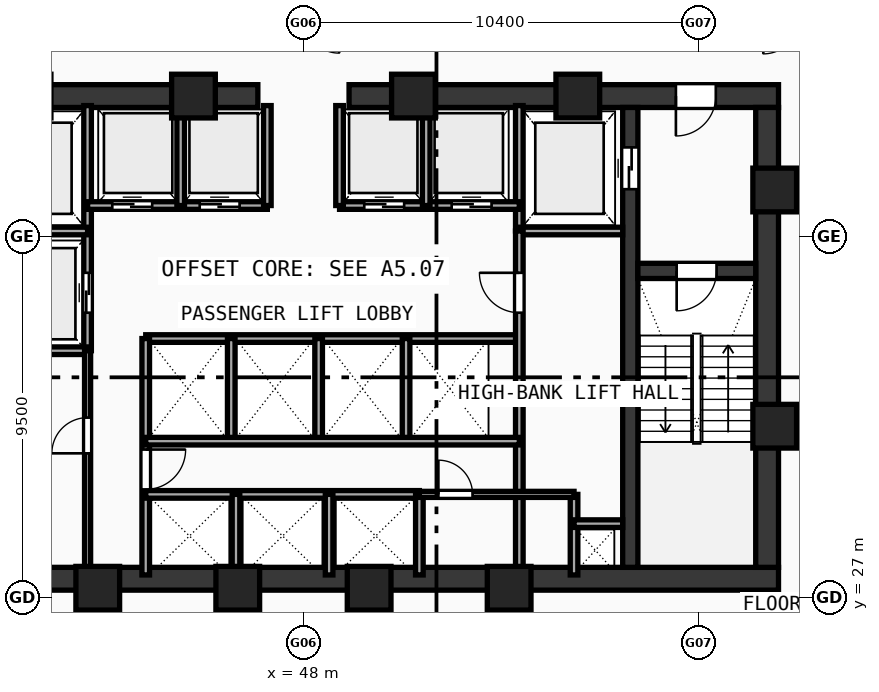
"""IFC4 building model, lengths in metres.
Left out: names, types, materials, properties, quantities, classifications, styles, units other than length and angle.
Written with IfcOpenShell. Run it as: python <this file> out.ifc"""

import sys

from ifc_helpers import new_model, si_unit, direction, frame, frame_2d, origin, origin_with_axes, origin_2d, place, context, subcontext, project, spatial, rectangle, hollow_rectangle, extrude, source, transform, mapped, element, fill, save


model = new_model("IFC4")
c1 = context("Model", 3, precision=1e-05, world=origin(), true_north=direction((0.0, 1.0)))
c2 = subcontext(c1, "Body", "Model", "MODEL_VIEW")
j1 = project(units=[si_unit("LENGTHUNIT", "METRE"), si_unit("PLANEANGLEUNIT", "RADIAN")], contexts=[c1])
p1 = place(None, origin())
s1 = spatial("IfcSite", under=j1, at=p1, CompositionType="ELEMENT")
p2 = place(p1, origin())
s2 = spatial("IfcBuilding", under=s1, at=p2, CompositionType="ELEMENT")
p3 = place(p2, frame((0.0, 0.0, 88.78)))
s3 = spatial("IfcBuildingStorey", under=s2, at=p3, CompositionType="ELEMENT", Elevation=88.78)
p4 = place(p3, frame((35.5, 27.5, 0.0), z_axis=(0.0, 0.0, 1.0), x_axis=(1.0, 0.0, 0.0)))
e1 = element("IfcWall", 1, at=p4, inside=s3, PredefinedType="SHEAR", context=c2, shape_type="SweptSolid", body=[
    extrude(rectangle(XDim=25.0, YDim=0.6, at=frame_2d((12.5, 0.0))), origin(), (0.0, 0.0, 1.0), 3.54),
])
p5 = place(p3, frame((35.5, 40.2, 0.0), z_axis=(0.0, 0.0, 1.0), x_axis=(1.0, 0.0, 0.0)))
e2 = element("IfcWall", 2, at=p5, inside=s3, PredefinedType="SHEAR", context=c2, shape_type="SweptSolid", body=[
    extrude(rectangle(XDim=11.3, YDim=0.6, at=frame_2d((5.65, 0.0))), origin(), (0.0, 0.0, 1.0), 3.54),
])
p6 = place(p5, frame((1.65, 0.0, 0.0)))
e3 = element("IfcOpeningElement", 3, at=p6, cuts=e2, PredefinedType="OPENING", context=c2, shape_type="SweptSolid", body=[
    extrude(rectangle(XDim=1.05, YDim=2.1, at=frame_2d((0.525, 1.05))), frame((0.0, 0.31, 0.0), z_axis=(0.0, -1.0, 0.0), x_axis=(1.0, 0.0, 0.0)), (0.0, 0.0, 1.0), 0.62),
])
p7 = place(p3, frame((49.2, 40.2, 0.0), z_axis=(0.0, 0.0, 1.0), x_axis=(1.0, 0.0, 0.0)))
e4 = element("IfcWall", 4, at=p7, inside=s3, PredefinedType="SHEAR", context=c2, shape_type="SweptSolid", body=[
    extrude(rectangle(XDim=11.3, YDim=0.6, at=frame_2d((5.65, 0.0))), origin(), (0.0, 0.0, 1.0), 3.54),
])
p8 = place(p7, frame((8.6, 0.0, 0.0)))
e5 = element("IfcOpeningElement", 5, at=p8, cuts=e4, PredefinedType="OPENING", context=c2, shape_type="SweptSolid", body=[
    extrude(rectangle(XDim=1.05, YDim=2.1, at=frame_2d((0.525, 1.05))), frame((0.0, 0.31, 0.0), z_axis=(0.0, -1.0, 0.0), x_axis=(1.0, 0.0, 0.0)), (0.0, 0.0, 1.0), 0.62),
])
p9 = place(p3, frame((60.2, 27.8, 0.0), z_axis=(0.0, 0.0, 1.0), x_axis=(0.0, 1.0, 0.0)))
e6 = element("IfcWall", 6, at=p9, inside=s3, PredefinedType="SHEAR", context=c2, shape_type="SweptSolid", body=[
    extrude(rectangle(XDim=12.1, YDim=0.6, at=frame_2d((6.05, 0.0))), origin(), (0.0, 0.0, 1.0), 3.54),
])
p10 = place(p3, frame((56.6, 27.8, 0.0), z_axis=(0.0, 0.0, 1.0), x_axis=(0.0, 1.0, 0.0)))
e7 = element("IfcWall", 7, at=p10, inside=s3, PredefinedType="SHEAR", context=c2, shape_type="SweptSolid", body=[
    extrude(rectangle(XDim=12.1, YDim=0.4, at=frame_2d((6.05, 0.0))), origin(), (0.0, 0.0, 1.0), 3.54),
])
p11 = place(p10, frame((9.95, 0.0, 0.0)))
e8 = element("IfcOpeningElement", 8, at=p11, cuts=e7, PredefinedType="OPENING", context=c2, shape_type="SweptSolid", body=[
    extrude(rectangle(XDim=1.1, YDim=2.1, at=frame_2d((0.55, 1.05))), frame((0.0, 0.21, 0.0), z_axis=(0.0, -1.0, 0.0), x_axis=(1.0, 0.0, 0.0)), (0.0, 0.0, 1.0), 0.42),
])
p12 = place(p3, frame((56.8, 35.6, 0.0), z_axis=(0.0, 0.0, 1.0), x_axis=(1.0, 0.0, 0.0)))
e9 = element("IfcWall", 9, at=p12, inside=s3, PredefinedType="SHEAR", context=c2, shape_type="SweptSolid", body=[
    extrude(rectangle(XDim=3.1, YDim=0.4, at=frame_2d((1.55, 0.0))), origin(), (0.0, 0.0, 1.0), 3.54),
])
p13 = place(p12, frame((1.02, 0.0, 0.0)))
e10 = element("IfcOpeningElement", 10, at=p13, cuts=e9, PredefinedType="OPENING", context=c2, shape_type="SweptSolid", body=[
    extrude(rectangle(XDim=1.05, YDim=2.1, at=frame_2d((0.525, 1.05))), frame((0.0, 0.21, 0.0), z_axis=(0.0, -1.0, 0.0), x_axis=(1.0, 0.0, 0.0)), (0.0, 0.0, 1.0), 0.42),
])
m1 = source(origin(), c2, "Body", "SweptSolid", [
    extrude(hollow_rectangle(XDim=1.15, YDim=1.15, WallThickness=0.048, at=origin_2d()), origin(), (0.0, 0.0, 1.0), 3.8),
])
for number, where, z_axis, x_axis in (
    (11, (42.588, 27.25, -0.26), (0.0, 0.0, 1.0), (1.0, 0.0, 0.0)),
    (12, (46.272, 27.25, -0.26), (0.0, 0.0, 1.0), (1.0, 0.0, 0.0)),
    (13, (49.729, 27.25, -0.26), (0.0, 0.0, 1.0), (1.0, 0.0, 0.0)),
    (14, (53.412, 27.25, -0.26), (0.0, 0.0, 1.0), (1.0, 0.0, 0.0)),
    (15, (60.4, 31.513, -0.26), (0.0, 0.0, 1.0), (1.0, 0.0, 0.0)),
    (16, (60.4, 37.729, -0.26), (0.0, 0.0, 1.0), (1.0, 0.0, 0.0)),
    (17, (55.219, 40.2, -0.26), (0.0, 0.0, 1.0), (1.0, 0.0, 0.0)),
    (18, (50.894, 40.2, -0.26), (0.0, 0.0, 1.0), (1.0, 0.0, 0.0)),
    (19, (45.106, 40.2, -0.26), (0.0, 0.0, 1.0), (1.0, 0.0, 0.0)),
):
    element("IfcColumn", number, at=place(p3, frame(where, z_axis=z_axis, x_axis=x_axis)), inside=s3, PredefinedType="COLUMN", context=c2, shape_type="MappedRepresentation", body=[
        mapped(m1, transform((0.0, 0.0, 0.0), scale=1.0)),
    ])
p14 = place(p3, frame((42.32, 33.5, 0.0), z_axis=(0.0, 0.0, 1.0), x_axis=(0.0, 1.0, 0.0)))
e20 = element("IfcWall", 20, at=p14, inside=s3, PredefinedType="SOLIDWALL", context=c2, shape_type="SweptSolid", body=[
    extrude(rectangle(XDim=6.45, YDim=0.2, at=frame_2d((3.225, 0.0))), origin(), (0.0, 0.0, 1.0), 3.54),
])
p15 = place(p14, frame((1.0, 0.0, 0.0)))
e21 = element("IfcOpeningElement", 21, at=p15, cuts=e20, PredefinedType="OPENING", context=c2, shape_type="SweptSolid", body=[
    extrude(rectangle(XDim=1.05, YDim=2.1, at=frame_2d((0.525, 1.05))), frame((0.0, 0.11, 0.0), z_axis=(0.0, -1.0, 0.0), x_axis=(1.0, 0.0, 0.0)), (0.0, 0.0, 1.0), 0.22),
])
for number, where, z_axis, x_axis in (
    (22, (39.6, 36.65, 0.0), (0.0, 0.0, 1.0), (1.0, 0.0, 0.0)),
    (23, (39.6, 33.5, 0.0), (0.0, 0.0, 1.0), (1.0, 0.0, 0.0)),
):
    element("IfcWall", number, at=place(p3, frame(where, z_axis=z_axis, x_axis=x_axis)), inside=s3, PredefinedType="SOLIDWALL", context=c2, shape_type="SweptSolid", body=[
        extrude(rectangle(XDim=2.72, YDim=0.2, at=frame_2d((1.36, 0.0))), origin(), (0.0, 0.0, 1.0), 3.54),
    ])
p16 = place(p3, frame((53.68, 36.65, 0.0), z_axis=(0.0, 0.0, 1.0), x_axis=(0.0, 1.0, 0.0)))
e24 = element("IfcWall", 24, at=p16, inside=s3, PredefinedType="SOLIDWALL", context=c2, shape_type="SweptSolid", body=[
    extrude(rectangle(XDim=3.3, YDim=0.2, at=frame_2d((1.65, 0.0))), origin(), (0.0, 0.0, 1.0), 3.54),
])
p17 = place(p3, frame((53.68, 36.65, 0.0), z_axis=(0.0, 0.0, 1.0), x_axis=(1.0, 0.0, 0.0)))
e25 = element("IfcWall", 25, at=p17, inside=s3, PredefinedType="SOLIDWALL", context=c2, shape_type="SweptSolid", body=[
    extrude(rectangle(XDim=2.72, YDim=0.2, at=frame_2d((1.36, 0.0))), origin(), (0.0, 0.0, 1.0), 3.54),
])
p18 = place(p3, frame((42.32, 37.32, 0.0), z_axis=(0.0, 0.0, 1.0), x_axis=(1.0, 0.0, 0.0)))
e26 = element("IfcWall", 26, at=p18, inside=s3, PredefinedType="SOLIDWALL", context=c2, shape_type="SweptSolid", body=[
    extrude(rectangle(XDim=4.73, YDim=0.2, at=frame_2d((2.365, 0.0))), origin(), (0.0, 0.0, 1.0), 3.54),
])
p19 = place(p18, frame((0.65, 0.0, 0.0)))
e27 = element("IfcOpeningElement", 27, at=p19, cuts=e26, PredefinedType="OPENING", context=c2, shape_type="SweptSolid", body=[
    extrude(rectangle(XDim=1.05, YDim=2.1, at=frame_2d((0.525, 1.05))), frame((0.0, 0.11, 0.0), z_axis=(0.0, -1.0, 0.0), x_axis=(1.0, 0.0, 0.0)), (0.0, 0.0, 1.0), 0.22),
])
p20 = place(p18, frame((2.95, 0.0, 0.0)))
e28 = element("IfcOpeningElement", 28, at=p20, cuts=e26, PredefinedType="OPENING", context=c2, shape_type="SweptSolid", body=[
    extrude(rectangle(XDim=1.05, YDim=2.1, at=frame_2d((0.525, 1.05))), frame((0.0, 0.11, 0.0), z_axis=(0.0, -1.0, 0.0), x_axis=(1.0, 0.0, 0.0)), (0.0, 0.0, 1.0), 0.22),
])
p21 = place(p3, frame((48.95, 37.32, 0.0), z_axis=(0.0, 0.0, 1.0), x_axis=(1.0, 0.0, 0.0)))
e29 = element("IfcWall", 29, at=p21, inside=s3, PredefinedType="SOLIDWALL", context=c2, shape_type="SweptSolid", body=[
    extrude(rectangle(XDim=4.73, YDim=0.2, at=frame_2d((2.365, 0.0))), origin(), (0.0, 0.0, 1.0), 3.54),
])
p22 = place(p21, frame((0.65, 0.0, 0.0)))
e30 = element("IfcOpeningElement", 30, at=p22, cuts=e29, PredefinedType="OPENING", context=c2, shape_type="SweptSolid", body=[
    extrude(rectangle(XDim=1.05, YDim=2.1, at=frame_2d((0.525, 1.05))), frame((0.0, 0.11, 0.0), z_axis=(0.0, -1.0, 0.0), x_axis=(1.0, 0.0, 0.0)), (0.0, 0.0, 1.0), 0.22),
])
p23 = place(p21, frame((2.95, 0.0, 0.0)))
e31 = element("IfcOpeningElement", 31, at=p23, cuts=e29, PredefinedType="OPENING", context=c2, shape_type="SweptSolid", body=[
    extrude(rectangle(XDim=1.05, YDim=2.1, at=frame_2d((0.525, 1.05))), frame((0.0, 0.11, 0.0), z_axis=(0.0, -1.0, 0.0), x_axis=(1.0, 0.0, 0.0)), (0.0, 0.0, 1.0), 0.22),
])
for number, where, z_axis, x_axis in (
    (32, (47.05, 37.32, 0.0), (0.0, 0.0, 1.0), (0.0, 1.0, 0.0)),
    (33, (48.95, 37.32, 0.0), (0.0, 0.0, 1.0), (0.0, 1.0, 0.0)),
    (34, (44.77, 37.32, 0.0), (0.0, 0.0, 1.0), (0.0, 1.0, 0.0)),
    (35, (51.23, 37.32, 0.0), (0.0, 0.0, 1.0), (0.0, 1.0, 0.0)),
):
    element("IfcWall", number, at=place(p3, frame(where, z_axis=z_axis, x_axis=x_axis)), inside=s3, PredefinedType="SOLIDWALL", context=c2, shape_type="SweptSolid", body=[
        extrude(rectangle(XDim=2.63, YDim=0.2, at=frame_2d((1.315, 0.0))), origin(), (0.0, 0.0, 1.0), 3.54),
    ])
p24 = place(p3, frame((43.85, 33.82, 0.0), z_axis=(0.0, 0.0, 1.0), x_axis=(1.0, 0.0, 0.0)))
e36 = element("IfcWall", 36, at=p24, inside=s3, PredefinedType="SOLIDWALL", context=c2, shape_type="SweptSolid", body=[
    extrude(rectangle(XDim=9.83, YDim=0.2, at=frame_2d((4.915, 0.0))), origin(), (0.0, 0.0, 1.0), 3.54),
])
p25 = place(p3, frame((43.85, 27.6, 0.0), z_axis=(0.0, 0.0, 1.0), x_axis=(0.0, 1.0, 0.0)))
e37 = element("IfcWall", 37, at=p25, inside=s3, PredefinedType="SOLIDWALL", context=c2, shape_type="SweptSolid", body=[
    extrude(rectangle(XDim=6.22, YDim=0.2, at=frame_2d((3.11, 0.0))), origin(), (0.0, 0.0, 1.0), 3.54),
])
p26 = place(p25, frame((2.25, 0.0, 0.0)))
e38 = element("IfcOpeningElement", 38, at=p26, cuts=e37, PredefinedType="OPENING", context=c2, shape_type="SweptSolid", body=[
    extrude(rectangle(XDim=1.05, YDim=2.1, at=frame_2d((0.525, 1.05))), frame((0.0, 0.11, 0.0), z_axis=(0.0, -1.0, 0.0), x_axis=(1.0, 0.0, 0.0)), (0.0, 0.0, 1.0), 0.22),
])
p27 = place(p3, frame((53.68, 27.6, 0.0), z_axis=(0.0, 0.0, 1.0), x_axis=(0.0, 1.0, 0.0)))
e39 = element("IfcWall", 39, at=p27, inside=s3, PredefinedType="SOLIDWALL", context=c2, shape_type="SweptSolid", body=[
    extrude(rectangle(XDim=9.05, YDim=0.2, at=frame_2d((4.525, 0.0))), origin(), (0.0, 0.0, 1.0), 3.54),
])
p28 = place(p27, frame((6.9, 0.0, 0.0)))
e40 = element("IfcOpeningElement", 40, at=p28, cuts=e39, PredefinedType="OPENING", context=c2, shape_type="SweptSolid", body=[
    extrude(rectangle(XDim=1.05, YDim=2.1, at=frame_2d((0.525, 1.05))), frame((0.0, 0.11, 0.0), z_axis=(0.0, -1.0, 0.0), x_axis=(1.0, 0.0, 0.0)), (0.0, 0.0, 1.0), 0.22),
])
for number, where, z_axis, x_axis in (
    (41, (46.1, 31.12, 0.0), (0.0, 0.0, 1.0), (0.0, 1.0, 0.0)),
    (42, (48.4, 31.12, 0.0), (0.0, 0.0, 1.0), (0.0, 1.0, 0.0)),
    (43, (50.7, 31.12, 0.0), (0.0, 0.0, 1.0), (0.0, 1.0, 0.0)),
):
    element("IfcWall", number, at=place(p3, frame(where, z_axis=z_axis, x_axis=x_axis)), inside=s3, PredefinedType="SOLIDWALL", context=c2, shape_type="SweptSolid", body=[
        extrude(rectangle(XDim=2.7, YDim=0.2, at=frame_2d((1.35, 0.0))), origin(), (0.0, 0.0, 1.0), 3.54),
    ])
p29 = place(p3, frame((43.85, 29.72, 0.0), z_axis=(0.0, 0.0, 1.0), x_axis=(1.0, 0.0, 0.0)))
e44 = element("IfcWall", 44, at=p29, inside=s3, PredefinedType="SOLIDWALL", context=c2, shape_type="SweptSolid", body=[
    extrude(rectangle(XDim=7.2, YDim=0.2, at=frame_2d((3.6, 0.0))), origin(), (0.0, 0.0, 1.0), 3.54),
])
p30 = place(p3, frame((51.05, 27.6, 0.0), z_axis=(0.0, 0.0, 1.0), x_axis=(0.0, 1.0, 0.0)))
e45 = element("IfcWall", 45, at=p30, inside=s3, PredefinedType="SOLIDWALL", context=c2, shape_type="SweptSolid", body=[
    extrude(rectangle(XDim=2.12, YDim=0.2, at=frame_2d((1.06, 0.0))), origin(), (0.0, 0.0, 1.0), 3.54),
])
p31 = place(p3, frame((43.85, 31.12, 0.0), z_axis=(0.0, 0.0, 1.0), x_axis=(1.0, 0.0, 0.0)))
e46 = element("IfcWall", 46, at=p31, inside=s3, PredefinedType="SOLIDWALL", context=c2, shape_type="SweptSolid", body=[
    extrude(rectangle(XDim=9.83, YDim=0.2, at=frame_2d((4.915, 0.0))), origin(), (0.0, 0.0, 1.0), 3.54),
])
for number, where, z_axis, x_axis in (
    (47, (46.225, 27.6, 0.0), (0.0, 0.0, 1.0), (0.0, 1.0, 0.0)),
    (48, (48.675, 27.6, 0.0), (0.0, 0.0, 1.0), (0.0, 1.0, 0.0)),
    (49, (55.12, 27.6, 0.0), (0.0, 0.0, 1.0), (0.0, 1.0, 0.0)),
):
    element("IfcWall", number, at=place(p3, frame(where, z_axis=z_axis, x_axis=x_axis)), inside=s3, PredefinedType="SOLIDWALL", context=c2, shape_type="SweptSolid", body=[
        extrude(rectangle(XDim=2.12, YDim=0.2, at=frame_2d((1.06, 0.0))), origin(), (0.0, 0.0, 1.0), 3.54),
    ])
p32 = place(p3, frame((55.12, 28.95, 0.0), z_axis=(0.0, 0.0, 1.0), x_axis=(1.0, 0.0, 0.0)))
e50 = element("IfcWall", 50, at=p32, inside=s3, PredefinedType="SOLIDWALL", context=c2, shape_type="SweptSolid", body=[
    extrude(rectangle(XDim=1.28, YDim=0.2, at=frame_2d((0.64, 0.0))), origin(), (0.0, 0.0, 1.0), 3.54),
])
p33 = place(p3, frame((42.32, 27.6, 0.0), z_axis=(0.0, 0.0, 1.0), x_axis=(0.0, 1.0, 0.0)))
e51 = element("IfcWall", 51, at=p33, inside=s3, PredefinedType="PARTITIONING", context=c2, shape_type="SweptSolid", body=[
    extrude(rectangle(XDim=5.9, YDim=0.16, at=frame_2d((2.95, 0.0))), origin(), (0.0, 0.0, 1.0), 3.54),
])
p34 = place(p33, frame((3.2, 0.0, 0.0)))
e52 = element("IfcOpeningElement", 52, at=p34, cuts=e51, PredefinedType="OPENING", context=c2, shape_type="SweptSolid", body=[
    extrude(rectangle(XDim=0.94, YDim=2.1, at=frame_2d((0.47, 1.05))), frame((0.0, 0.09, 0.0), z_axis=(0.0, -1.0, 0.0), x_axis=(1.0, 0.0, 0.0)), (0.0, 0.0, 1.0), 0.18),
])
p35 = place(p3, frame((51.05, 29.72, 0.0), z_axis=(0.0, 0.0, 1.0), x_axis=(1.0, 0.0, 0.0)))
e53 = element("IfcWall", 53, at=p35, inside=s3, PredefinedType="PARTITIONING", context=c2, shape_type="SweptSolid", body=[
    extrude(rectangle(XDim=4.07, YDim=0.16, at=frame_2d((2.035, 0.0))), origin(), (0.0, 0.0, 1.0), 3.54),
])
p36 = place(p35, frame((0.5, 0.0, 0.0)))
e54 = element("IfcOpeningElement", 54, at=p36, cuts=e53, PredefinedType="OPENING", context=c2, shape_type="SweptSolid", body=[
    extrude(rectangle(XDim=0.9, YDim=2.1, at=frame_2d((0.45, 1.05))), frame((0.0, 0.09, 0.0), z_axis=(0.0, -1.0, 0.0), x_axis=(1.0, 0.0, 0.0)), (0.0, 0.0, 1.0), 0.18),
])
m2 = source(origin(), c2, "Body", "SweptSolid", [
    extrude(rectangle(XDim=1.05, YDim=2.1, at=frame_2d((0.525, 1.05))), frame((0.0, 0.025, 0.0), z_axis=(0.0, -1.0, 0.0), x_axis=(1.0, 0.0, 0.0)), (0.0, 0.0, 1.0), 0.05),
])
p37 = place(p13, frame((1.05, 0.0, 0.0), z_axis=(0.0, 0.0, 1.0), x_axis=(-1.0, 0.0, 0.0)))
e55 = element("IfcDoor", 55, at=p37, inside=s3, OperationType="SINGLE_SWING_RIGHT", PredefinedType="DOOR", context=c2, shape_type="MappedRepresentation", body=[
    mapped(m2, transform((0.0, 0.0, 0.0), scale=1.0)),
])
fill(e10, e55)
p38 = place(p8, frame((1.05, 0.0, 0.0), z_axis=(0.0, 0.0, 1.0), x_axis=(-1.0, 0.0, 0.0)))
e56 = element("IfcDoor", 56, at=p38, inside=s3, OperationType="SINGLE_SWING_RIGHT", PredefinedType="DOOR", context=c2, shape_type="MappedRepresentation", body=[
    mapped(m2, transform((0.0, 0.0, 0.0), scale=1.0)),
])
fill(e5, e56)
m3 = source(origin(), c2, "Body", "SweptSolid", [
    extrude(rectangle(XDim=1.1, YDim=2.1, at=frame_2d((0.55, 1.05))), frame((0.0, 0.025, 0.0), z_axis=(0.0, -1.0, 0.0), x_axis=(1.0, 0.0, 0.0)), (0.0, 0.0, 1.0), 0.05),
])
p39 = place(p11, origin_with_axes())
e57 = element("IfcDoor", 57, at=p39, inside=s3, OperationType="DOUBLE_DOOR_SLIDING", PredefinedType="DOOR", context=c2, shape_type="MappedRepresentation", body=[
    mapped(m3, transform((0.0, 0.0, 0.0), scale=1.0)),
])
fill(e8, e57)
p40 = place(p15, origin_with_axes())
e58 = element("IfcDoor", 58, at=p40, inside=s3, OperationType="DOUBLE_DOOR_SLIDING", PredefinedType="DOOR", context=c2, shape_type="MappedRepresentation", body=[
    mapped(m2, transform((0.0, 0.0, 0.0), scale=1.0)),
])
fill(e21, e58)
p41 = place(p19, frame((1.05, 0.0, 0.0), z_axis=(0.0, 0.0, 1.0), x_axis=(-1.0, 0.0, 0.0)))
e59 = element("IfcDoor", 59, at=p41, inside=s3, OperationType="DOUBLE_DOOR_SLIDING", PredefinedType="DOOR", context=c2, shape_type="MappedRepresentation", body=[
    mapped(m2, transform((0.0, 0.0, 0.0), scale=1.0)),
])
fill(e27, e59)
p42 = place(p20, frame((1.05, 0.0, 0.0), z_axis=(0.0, 0.0, 1.0), x_axis=(-1.0, 0.0, 0.0)))
e60 = element("IfcDoor", 60, at=p42, inside=s3, OperationType="DOUBLE_DOOR_SLIDING", PredefinedType="DOOR", context=c2, shape_type="MappedRepresentation", body=[
    mapped(m2, transform((0.0, 0.0, 0.0), scale=1.0)),
])
fill(e28, e60)
p43 = place(p22, frame((1.05, 0.0, 0.0), z_axis=(0.0, 0.0, 1.0), x_axis=(-1.0, 0.0, 0.0)))
e61 = element("IfcDoor", 61, at=p43, inside=s3, OperationType="DOUBLE_DOOR_SLIDING", PredefinedType="DOOR", context=c2, shape_type="MappedRepresentation", body=[
    mapped(m2, transform((0.0, 0.0, 0.0), scale=1.0)),
])
fill(e30, e61)
p44 = place(p23, frame((1.05, 0.0, 0.0), z_axis=(0.0, 0.0, 1.0), x_axis=(-1.0, 0.0, 0.0)))
e62 = element("IfcDoor", 62, at=p44, inside=s3, OperationType="DOUBLE_DOOR_SLIDING", PredefinedType="DOOR", context=c2, shape_type="MappedRepresentation", body=[
    mapped(m2, transform((0.0, 0.0, 0.0), scale=1.0)),
])
fill(e31, e62)
p45 = place(p26, frame((1.05, 0.0, 0.0), z_axis=(0.0, 0.0, 1.0), x_axis=(-1.0, 0.0, 0.0)))
e63 = element("IfcDoor", 63, at=p45, inside=s3, OperationType="SINGLE_SWING_LEFT", PredefinedType="DOOR", context=c2, shape_type="MappedRepresentation", body=[
    mapped(m2, transform((0.0, 0.0, 0.0), scale=1.0)),
])
fill(e38, e63)
p46 = place(p28, origin_with_axes())
e64 = element("IfcDoor", 64, at=p46, inside=s3, OperationType="SINGLE_SWING_RIGHT", PredefinedType="DOOR", context=c2, shape_type="MappedRepresentation", body=[
    mapped(m2, transform((0.0, 0.0, 0.0), scale=1.0)),
])
fill(e40, e64)
m4 = source(origin(), c2, "Body", "SweptSolid", [
    extrude(rectangle(XDim=0.94, YDim=2.1, at=frame_2d((0.47, 1.05))), frame((0.0, 0.025, 0.0), z_axis=(0.0, -1.0, 0.0), x_axis=(1.0, 0.0, 0.0)), (0.0, 0.0, 1.0), 0.05),
])
p47 = place(p34, origin_with_axes())
e65 = element("IfcDoor", 65, at=p47, inside=s3, OperationType="SINGLE_SWING_LEFT", PredefinedType="DOOR", context=c2, shape_type="MappedRepresentation", body=[
    mapped(m4, transform((0.0, 0.0, 0.0), scale=1.0)),
])
fill(e52, e65)
m5 = source(origin(), c2, "Body", "SweptSolid", [
    extrude(rectangle(XDim=0.9, YDim=2.1, at=frame_2d((0.45, 1.05))), frame((0.0, 0.025, 0.0), z_axis=(0.0, -1.0, 0.0), x_axis=(1.0, 0.0, 0.0)), (0.0, 0.0, 1.0), 0.05),
])
p48 = place(p36, origin_with_axes())
e66 = element("IfcDoor", 66, at=p48, inside=s3, OperationType="SINGLE_SWING_LEFT", PredefinedType="DOOR", context=c2, shape_type="MappedRepresentation", body=[
    mapped(m5, transform((0.0, 0.0, 0.0), scale=1.0)),
])
fill(e54, e66)
save(model, sys.argv[1])
